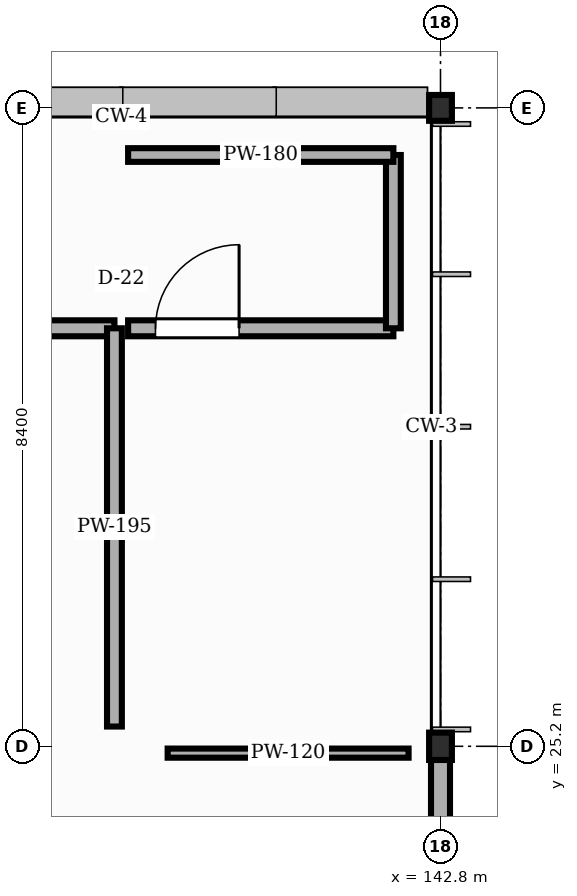
"""IFC4 building model, lengths in metres.
Left out: names, types, materials, properties, quantities, classifications, styles, units other than length and angle.
Written with IfcOpenShell. Run it as: python <this file> out.ifc"""

import sys

from ifc_helpers import new_model, si_unit, direction, frame, frame_2d, origin, origin_2d, place, context, subcontext, project, spatial, rectangle, i_section, extrude, element, fill, save


model = new_model("IFC4")
c1 = context("Model", 3, precision=1e-05, world=origin(), true_north=direction((0.0, 1.0)))
c2 = subcontext(c1, "Body", "Model", "MODEL_VIEW")
j1 = project(units=[si_unit("LENGTHUNIT", "METRE"), si_unit("PLANEANGLEUNIT", "RADIAN")], contexts=[c1])
p1 = place(None, origin())
s1 = spatial("IfcSite", under=j1, at=p1, CompositionType="ELEMENT")
p2 = place(p1, origin())
s2 = spatial("IfcBuilding", under=s1, at=p2, CompositionType="ELEMENT")
p3 = place(p2, frame((0.0, 0.0, 5.4)))
s3 = spatial("IfcBuildingStorey", under=s2, at=p3, CompositionType="ELEMENT", Elevation=5.4)
p4 = place(p3, frame((142.8, 25.2, 0.0), z_axis=(0.0, 0.0, 1.0), x_axis=(1.0, 0.0, 0.0)))
e1 = element("IfcColumn", 1, at=p4, inside=s3, PredefinedType="COLUMN", context=c2, shape_type="SweptSolid", body=[
    extrude(i_section(OverallWidth=0.3, OverallDepth=0.36, WebThickness=0.012, FlangeThickness=0.022, FilletRadius=0.027, at=origin_2d()), origin(), (0.0, 0.0, 1.0), 4.5),
])
p5 = place(p3, frame((142.8, 33.6, 0.0), z_axis=(0.0, 0.0, 1.0), x_axis=(1.0, 0.0, 0.0)))
e2 = element("IfcColumn", 2, at=p5, inside=s3, PredefinedType="COLUMN", context=c2, shape_type="SweptSolid", body=[
    extrude(i_section(OverallWidth=0.3, OverallDepth=0.34, WebThickness=0.012, FlangeThickness=0.021, FilletRadius=0.027, at=origin_2d()), origin(), (0.0, 0.0, 1.0), 4.5),
])
p6 = place(p3, frame((142.8, 16.966, 0.0), z_axis=(0.0, 0.0, 1.0), x_axis=(0.0, 1.0, 0.0)))
e3 = element("IfcWall", 3, at=p6, inside=s3, PredefinedType="STANDARD", context=c2, shape_type="SweptSolid", body=[
    extrude(rectangle(XDim=8.058, YDim=0.25, at=frame_2d((4.029, 0.0))), origin(), (0.0, 0.0, 1.0), 4.012),
])
p7 = place(p6, frame((0.85, 0.0, 0.9)))
e4 = element("IfcOpeningElement", 4, at=p7, cuts=e3, PredefinedType="OPENING", context=c2, shape_type="SweptSolid", body=[
    extrude(rectangle(XDim=1.72, YDim=1.05, at=frame_2d((0.86, 0.525))), frame((0.0, 0.135, 0.0), z_axis=(0.0, -1.0, 0.0), x_axis=(1.0, 0.0, 0.0)), (0.0, 0.0, 1.0), 0.27),
])
p8 = place(p6, frame((5.388, 0.0, 0.9)))
e5 = element("IfcOpeningElement", 5, at=p8, cuts=e3, PredefinedType="OPENING", context=c2, shape_type="SweptSolid", body=[
    extrude(rectangle(XDim=1.82, YDim=1.05, at=frame_2d((0.91, 0.525))), frame((0.0, 0.135, 0.0), z_axis=(0.0, -1.0, 0.0), x_axis=(1.0, 0.0, 0.0)), (0.0, 0.0, 1.0), 0.27),
])
p9 = place(p3, frame((126.09, 30.7, -0.004), z_axis=(0.0, 0.0, 1.0), x_axis=(1.0, 0.0, 0.0)))
e6 = element("IfcWall", 6, at=p9, inside=s3, PredefinedType="STANDARD", context=c2, shape_type="SweptSolid", body=[
    extrude(rectangle(XDim=12.42, YDim=0.21, at=frame_2d((6.21, 0.0))), origin(), (0.0, 0.0, 1.0), 4.294),
])
p10 = place(p9, frame((3.797, 0.0, 0.0)))
e7 = element("IfcOpeningElement", 7, at=p10, cuts=e6, PredefinedType="OPENING", context=c2, shape_type="SweptSolid", body=[
    extrude(rectangle(XDim=1.1, YDim=2.06, at=frame_2d((0.55, 1.03))), frame((0.0, 0.115, 0.0), z_axis=(0.0, -1.0, 0.0), x_axis=(1.0, 0.0, 0.0)), (0.0, 0.0, 1.0), 0.23),
])
p11 = place(p3, frame((138.51, 30.7, -0.004), z_axis=(0.0, 0.0, 1.0), x_axis=(0.0, -1.0, 0.0)))
e8 = element("IfcWall", 8, at=p11, inside=s3, PredefinedType="STANDARD", context=c2, shape_type="SweptSolid", body=[
    extrude(rectangle(XDim=5.24, YDim=0.195, at=frame_2d((2.62, 0.0))), origin(), (0.0, 0.0, 1.0), 4.294),
])
p12 = place(p3, frame((139.21, 25.11, -0.004), z_axis=(0.0, 0.0, 1.0), x_axis=(1.0, 0.0, 0.0)))
e9 = element("IfcWall", 9, at=p12, inside=s3, PredefinedType="STANDARD", context=c2, shape_type="SweptSolid", body=[
    extrude(rectangle(XDim=3.17, YDim=0.12, at=frame_2d((1.585, 0.0))), origin(), (0.0, 0.0, 1.0), 3.686),
])
p13 = place(p3, frame((138.69, 30.7, -0.004), z_axis=(0.0, 0.0, 1.0), x_axis=(1.0, 0.0, 0.0)))
e10 = element("IfcWall", 10, at=p13, inside=s3, PredefinedType="STANDARD", context=c2, shape_type="SweptSolid", body=[
    extrude(rectangle(XDim=3.49, YDim=0.21, at=frame_2d((1.745, 0.0))), origin(), (0.0, 0.0, 1.0), 4.294),
])
p14 = place(p13, frame((0.36, 0.0, 0.0)))
e11 = element("IfcOpeningElement", 11, at=p14, cuts=e10, PredefinedType="OPENING", context=c2, shape_type="SweptSolid", body=[
    extrude(rectangle(XDim=1.1, YDim=2.22, at=frame_2d((0.55, 1.11))), frame((0.0, 0.115, 0.0), z_axis=(0.0, -1.0, 0.0), x_axis=(1.0, 0.0, 0.0)), (0.0, 0.0, 1.0), 0.23),
])
p15 = place(p3, frame((142.18, 30.7, -0.004), z_axis=(0.0, 0.0, 1.0), x_axis=(0.0, 1.0, 0.0)))
e12 = element("IfcWall", 12, at=p15, inside=s3, PredefinedType="STANDARD", context=c2, shape_type="SweptSolid", body=[
    extrude(rectangle(XDim=2.28, YDim=0.195, at=frame_2d((1.14, 0.0))), origin(), (0.0, 0.0, 1.0), 4.294),
])
p16 = place(p3, frame((142.18, 32.98, -0.004), z_axis=(0.0, 0.0, 1.0), x_axis=(-1.0, 0.0, 0.0)))
e13 = element("IfcWall", 13, at=p16, inside=s3, PredefinedType="STANDARD", context=c2, shape_type="SweptSolid", body=[
    extrude(rectangle(XDim=3.49, YDim=0.18, at=frame_2d((1.745, 0.0))), origin(), (0.0, 0.0, 1.0), 4.294),
])
p17 = place(p14, origin())
e14 = element("IfcDoor", 14, at=p17, inside=s3, OperationType="SINGLE_SWING_RIGHT", PredefinedType="DOOR", context=c2, shape_type="SweptSolid", body=[
    extrude(rectangle(XDim=1.1, YDim=2.22, at=frame_2d((0.55, 1.11))), frame((0.0, 0.025, 0.0), z_axis=(0.0, -1.0, 0.0), x_axis=(1.0, 0.0, 0.0)), (0.0, 0.0, 1.0), 0.05),
])
fill(e11, e14)
save(model, sys.argv[1])
